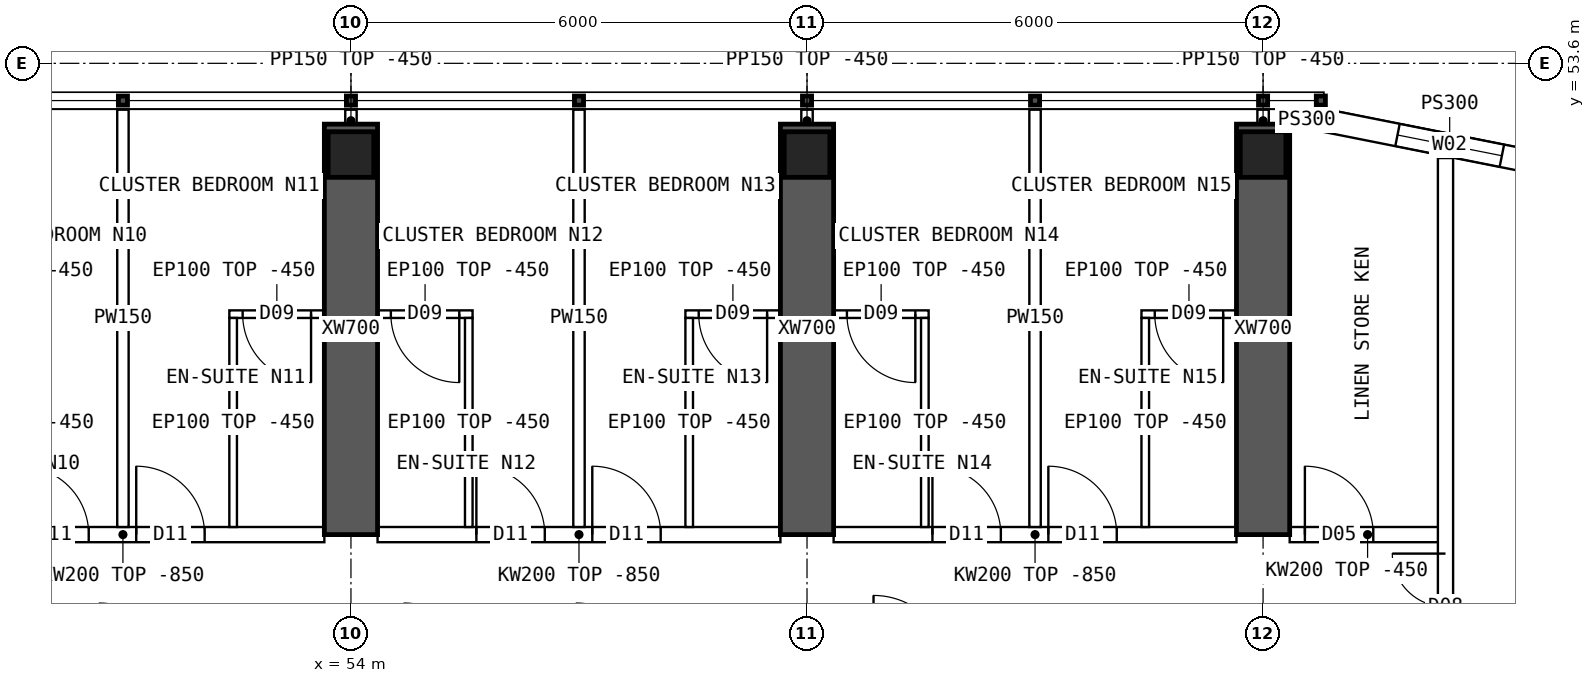
"""IFC4 building model, lengths in metres.
Left out: names, types, materials, properties, quantities, classifications, styles, units other than length and angle.
Written with IfcOpenShell. Run it as: python <this file> out.ifc"""

import sys

from ifc_helpers import new_model, si_unit, direction, frame, frame_2d, origin, origin_2d, place, context, subcontext, project, spatial, polyline, rectangle, hollow_rectangle, outline, extrude, element, fill, save


model = new_model("IFC4")
c1 = context("Model", 3, precision=1e-05, world=origin(), true_north=direction((0.0, 1.0)))
c2 = subcontext(c1, "Body", "Model", "MODEL_VIEW")
j1 = project(units=[si_unit("LENGTHUNIT", "METRE"), si_unit("PLANEANGLEUNIT", "RADIAN")], contexts=[c1])
p1 = place(None, origin())
s1 = spatial("IfcSite", under=j1, at=p1, CompositionType="ELEMENT")
p2 = place(p1, origin())
s2 = spatial("IfcBuilding", under=s1, at=p2, CompositionType="ELEMENT")
p3 = place(p2, frame((0.0, 0.0, 242.8)))
s3 = spatial("IfcBuildingStorey", under=s2, at=p3, CompositionType="ELEMENT", Elevation=242.8)
for number, where, z_axis, x_axis in (
    (1, (54.0, 52.4, 0.0), (0.0, 0.0, 1.0), (1.0, 0.0, 0.0)),
    (2, (60.0, 52.4, 0.0), (0.0, 0.0, 1.0), (1.0, 0.0, 0.0)),
    (3, (66.0, 52.4, 0.0), (0.0, 0.0, 1.0), (1.0, 0.0, 0.0)),
):
    element("IfcColumn", number, at=place(p3, frame(where, z_axis=z_axis, x_axis=x_axis)), inside=s3, PredefinedType="COLUMN", context=c2, shape_type="SweptSolid", body=[
        extrude(hollow_rectangle(XDim=0.6, YDim=0.6, WallThickness=0.06, at=origin_2d()), origin(), (0.0, 0.0, 1.0), 3.75),
    ])
for number, where, z_axis, x_axis in (
    (4, (54.0, 47.4, 0.0), (0.0, 0.0, 1.0), (0.0, 1.0, 0.0)),
    (5, (60.0, 47.4, 0.0), (0.0, 0.0, 1.0), (0.0, 1.0, 0.0)),
    (6, (66.0, 47.4, 0.0), (0.0, 0.0, 1.0), (0.0, 1.0, 0.0)),
):
    element("IfcWall", number, at=place(p3, frame(where, z_axis=z_axis, x_axis=x_axis)), inside=s3, PredefinedType="SHEAR", context=c2, shape_type="SweptSolid", body=[
        extrude(rectangle(XDim=5.4, YDim=0.7, at=frame_2d((2.7, 0.0))), origin(), (0.0, 0.0, 1.0), 3.75),
    ])
p4 = place(p3, frame((70.11, 52.192, 0.0), z_axis=(0.0, 0.0, 1.0), x_axis=(-0.98078325777, 0.195100490205, 0.0)))
e7 = element("IfcWall", 7, at=p4, inside=s3, PredefinedType="SOLIDWALL", context=c2, shape_type="SweptSolid", body=[
    extrude(outline(polyline([(-0.03, -0.15), (3.405, -0.15), (3.345, 0.15), (0.03, 0.15), (-0.03, -0.15)])), origin(), (0.0, 0.0, 1.0), 3.3),
])
p5 = place(p4, frame((0.988, 0.0, 0.9)))
e8 = element("IfcOpeningElement", 8, at=p5, cuts=e7, PredefinedType="OPENING", context=c2, shape_type="SweptSolid", body=[
    extrude(rectangle(XDim=1.4, YDim=1.8, at=frame_2d((0.7, 0.9))), frame((0.0, 0.16, 0.0), z_axis=(0.0, -1.0, 0.0), x_axis=(1.0, 0.0, 0.0)), (0.0, 0.0, 1.0), 0.32),
])
p6 = place(p3, frame((66.8, 52.85, 0.0), z_axis=(0.0, 0.0, 1.0), x_axis=(-1.0, 0.0, 0.0)))
e9 = element("IfcWall", 9, at=p6, inside=s3, PredefinedType="SOLIDWALL", context=c2, shape_type="SweptSolid", body=[
    extrude(rectangle(XDim=0.45, YDim=0.3, at=frame_2d((0.225, 0.0))), origin(), (0.0, 0.0, 1.0), 3.3),
])
p7 = place(p3, frame((48.35, 47.4, 0.0), z_axis=(0.0, 0.0, 1.0), x_axis=(1.0, 0.0, 0.0)))
e10 = element("IfcWall", 10, at=p7, inside=s3, PredefinedType="SOLIDWALL", context=c2, shape_type="SweptSolid", body=[
    extrude(outline(polyline([(0.0, 0.0), (5.3, 0.0), (5.3, 2.9), (0.0, 2.9), (0.0, 0.0)])), frame((0.0, 0.1, 0.0), z_axis=(0.0, -1.0, 0.0), x_axis=(1.0, 0.0, 0.0)), (0.0, 0.0, 1.0), 0.2),
])
p8 = place(p7, frame((1.3, 0.0, 0.0)))
e11 = element("IfcOpeningElement", 11, at=p8, cuts=e10, PredefinedType="OPENING", context=c2, shape_type="SweptSolid", body=[
    extrude(rectangle(XDim=0.9, YDim=2.1, at=frame_2d((0.45, 1.05))), frame((0.0, 0.11, 0.0), z_axis=(0.0, -1.0, 0.0), x_axis=(1.0, 0.0, 0.0)), (0.0, 0.0, 1.0), 0.22),
])
p9 = place(p7, frame((2.825, 0.0, 0.0)))
e12 = element("IfcOpeningElement", 12, at=p9, cuts=e10, PredefinedType="OPENING", context=c2, shape_type="SweptSolid", body=[
    extrude(rectangle(XDim=0.9, YDim=2.1, at=frame_2d((0.45, 1.05))), frame((0.0, 0.11, 0.0), z_axis=(0.0, -1.0, 0.0), x_axis=(1.0, 0.0, 0.0)), (0.0, 0.0, 1.0), 0.22),
])
p10 = place(p3, frame((54.35, 47.4, 0.0), z_axis=(0.0, 0.0, 1.0), x_axis=(1.0, 0.0, 0.0)))
e13 = element("IfcWall", 13, at=p10, inside=s3, PredefinedType="SOLIDWALL", context=c2, shape_type="SweptSolid", body=[
    extrude(outline(polyline([(0.0, 0.0), (5.3, 0.0), (5.3, 2.9), (0.0, 2.9), (0.0, 0.0)])), frame((0.0, 0.1, 0.0), z_axis=(0.0, -1.0, 0.0), x_axis=(1.0, 0.0, 0.0)), (0.0, 0.0, 1.0), 0.2),
])
p11 = place(p10, frame((1.3, 0.0, 0.0)))
e14 = element("IfcOpeningElement", 14, at=p11, cuts=e13, PredefinedType="OPENING", context=c2, shape_type="SweptSolid", body=[
    extrude(rectangle(XDim=0.9, YDim=2.1, at=frame_2d((0.45, 1.05))), frame((0.0, 0.11, 0.0), z_axis=(0.0, -1.0, 0.0), x_axis=(1.0, 0.0, 0.0)), (0.0, 0.0, 1.0), 0.22),
])
p12 = place(p10, frame((2.825, 0.0, 0.0)))
e15 = element("IfcOpeningElement", 15, at=p12, cuts=e13, PredefinedType="OPENING", context=c2, shape_type="SweptSolid", body=[
    extrude(rectangle(XDim=0.9, YDim=2.1, at=frame_2d((0.45, 1.05))), frame((0.0, 0.11, 0.0), z_axis=(0.0, -1.0, 0.0), x_axis=(1.0, 0.0, 0.0)), (0.0, 0.0, 1.0), 0.22),
])
p13 = place(p3, frame((60.35, 47.4, 0.0), z_axis=(0.0, 0.0, 1.0), x_axis=(1.0, 0.0, 0.0)))
e16 = element("IfcWall", 16, at=p13, inside=s3, PredefinedType="SOLIDWALL", context=c2, shape_type="SweptSolid", body=[
    extrude(outline(polyline([(0.0, 0.0), (5.3, 0.0), (5.3, 2.9), (0.0, 2.9), (0.0, 0.0)])), frame((0.0, 0.1, 0.0), z_axis=(0.0, -1.0, 0.0), x_axis=(1.0, 0.0, 0.0)), (0.0, 0.0, 1.0), 0.2),
])
p14 = place(p13, frame((1.3, 0.0, 0.0)))
e17 = element("IfcOpeningElement", 17, at=p14, cuts=e16, PredefinedType="OPENING", context=c2, shape_type="SweptSolid", body=[
    extrude(rectangle(XDim=0.9, YDim=2.1, at=frame_2d((0.45, 1.05))), frame((0.0, 0.11, 0.0), z_axis=(0.0, -1.0, 0.0), x_axis=(1.0, 0.0, 0.0)), (0.0, 0.0, 1.0), 0.22),
])
p15 = place(p13, frame((2.825, 0.0, 0.0)))
e18 = element("IfcOpeningElement", 18, at=p15, cuts=e16, PredefinedType="OPENING", context=c2, shape_type="SweptSolid", body=[
    extrude(rectangle(XDim=0.9, YDim=2.1, at=frame_2d((0.45, 1.05))), frame((0.0, 0.11, 0.0), z_axis=(0.0, -1.0, 0.0), x_axis=(1.0, 0.0, 0.0)), (0.0, 0.0, 1.0), 0.22),
])
p16 = place(p3, frame((66.35, 47.4, 0.0), z_axis=(0.0, 0.0, 1.0), x_axis=(1.0, 0.0, 0.0)))
e19 = element("IfcWall", 19, at=p16, inside=s3, PredefinedType="SOLIDWALL", context=c2, shape_type="SweptSolid", body=[
    extrude(rectangle(XDim=2.05, YDim=0.2, at=frame_2d((1.025, 0.0))), origin(), (0.0, 0.0, 1.0), 3.3),
])
p17 = place(p16, frame((0.2, 0.0, 0.0)))
e20 = element("IfcOpeningElement", 20, at=p17, cuts=e19, PredefinedType="OPENING", context=c2, shape_type="SweptSolid", body=[
    extrude(rectangle(XDim=0.9, YDim=2.1, at=frame_2d((0.45, 1.05))), frame((0.0, 0.11, 0.0), z_axis=(0.0, -1.0, 0.0), x_axis=(1.0, 0.0, 0.0)), (0.0, 0.0, 1.0), 0.22),
])
p18 = place(p3, frame((51.0, 52.99, 0.0), z_axis=(0.0, 0.0, 1.0), x_axis=(0.0, -1.0, 0.0)))
e21 = element("IfcWall", 21, at=p18, inside=s3, PredefinedType="PARTITIONING", context=c2, shape_type="SweptSolid", body=[
    extrude(outline(polyline([(0.0, 0.0), (5.49, 0.0), (5.49, 2.9), (5.442, 2.9), (5.44, 3.3), (0.792, 3.3), (0.79, 2.9), (0.392, 2.9), (0.39, 3.3), (0.0, 3.3), (0.0, 0.0)])), frame((0.0, 0.075, 0.0), z_axis=(0.0, -1.0, 0.0), x_axis=(1.0, 0.0, 0.0)), (0.0, 0.0, 1.0), 0.15),
])
p19 = place(p3, frame((52.4, 50.3, 0.0), z_axis=(0.0, 0.0, 1.0), x_axis=(1.0, 0.0, 0.0)))
e22 = element("IfcWall", 22, at=p19, inside=s3, PredefinedType="PARTITIONING", context=c2, shape_type="SweptSolid", body=[
    extrude(rectangle(XDim=1.25, YDim=0.1, at=frame_2d((0.625, 0.0))), origin(), (0.0, 0.0, 1.0), 3.3),
])
p20 = place(p19, frame((0.175, 0.0, 0.0)))
e23 = element("IfcOpeningElement", 23, at=p20, cuts=e22, PredefinedType="OPENING", context=c2, shape_type="SweptSolid", body=[
    extrude(rectangle(XDim=0.9, YDim=2.1, at=frame_2d((0.45, 1.05))), frame((0.0, 0.06, 0.0), z_axis=(0.0, -1.0, 0.0), x_axis=(1.0, 0.0, 0.0)), (0.0, 0.0, 1.0), 0.12),
])
p21 = place(p3, frame((52.45, 50.25, 0.0), z_axis=(0.0, 0.0, 1.0), x_axis=(0.0, -1.0, 0.0)))
e24 = element("IfcWall", 24, at=p21, inside=s3, PredefinedType="PARTITIONING", context=c2, shape_type="SweptSolid", body=[
    extrude(outline(polyline([(0.0, 0.0), (2.75, 0.0), (2.75, 2.9), (2.702, 2.9), (2.7, 3.3), (0.0, 3.3), (0.0, 0.0)])), frame((0.0, 0.05, 0.0), z_axis=(0.0, -1.0, 0.0), x_axis=(1.0, 0.0, 0.0)), (0.0, 0.0, 1.0), 0.1),
])
p22 = place(p3, frame((57.0, 52.99, 0.0), z_axis=(0.0, 0.0, 1.0), x_axis=(0.0, -1.0, 0.0)))
e25 = element("IfcWall", 25, at=p22, inside=s3, PredefinedType="PARTITIONING", context=c2, shape_type="SweptSolid", body=[
    extrude(outline(polyline([(0.0, 0.0), (5.49, 0.0), (5.49, 2.9), (5.442, 2.9), (5.44, 3.3), (0.792, 3.3), (0.79, 2.9), (0.392, 2.9), (0.39, 3.3), (0.0, 3.3), (0.0, 0.0)])), frame((0.0, 0.075, 0.0), z_axis=(0.0, -1.0, 0.0), x_axis=(1.0, 0.0, 0.0)), (0.0, 0.0, 1.0), 0.15),
])
p23 = place(p3, frame((54.35, 50.3, 0.0), z_axis=(0.0, 0.0, 1.0), x_axis=(1.0, 0.0, 0.0)))
e26 = element("IfcWall", 26, at=p23, inside=s3, PredefinedType="PARTITIONING", context=c2, shape_type="SweptSolid", body=[
    extrude(rectangle(XDim=1.25, YDim=0.1, at=frame_2d((0.625, 0.0))), origin(), (0.0, 0.0, 1.0), 3.3),
])
p24 = place(p23, frame((0.175, 0.0, 0.0)))
e27 = element("IfcOpeningElement", 27, at=p24, cuts=e26, PredefinedType="OPENING", context=c2, shape_type="SweptSolid", body=[
    extrude(rectangle(XDim=0.9, YDim=2.1, at=frame_2d((0.45, 1.05))), frame((0.0, 0.06, 0.0), z_axis=(0.0, -1.0, 0.0), x_axis=(1.0, 0.0, 0.0)), (0.0, 0.0, 1.0), 0.12),
])
p25 = place(p3, frame((55.55, 50.25, 0.0), z_axis=(0.0, 0.0, 1.0), x_axis=(0.0, -1.0, 0.0)))
e28 = element("IfcWall", 28, at=p25, inside=s3, PredefinedType="PARTITIONING", context=c2, shape_type="SweptSolid", body=[
    extrude(outline(polyline([(0.0, 0.0), (2.75, 0.0), (2.75, 2.9), (2.702, 2.9), (2.7, 3.3), (0.0, 3.3), (0.0, 0.0)])), frame((0.0, 0.05, 0.0), z_axis=(0.0, -1.0, 0.0), x_axis=(1.0, 0.0, 0.0)), (0.0, 0.0, 1.0), 0.1),
])
p26 = place(p3, frame((58.4, 50.3, 0.0), z_axis=(0.0, 0.0, 1.0), x_axis=(1.0, 0.0, 0.0)))
e29 = element("IfcWall", 29, at=p26, inside=s3, PredefinedType="PARTITIONING", context=c2, shape_type="SweptSolid", body=[
    extrude(rectangle(XDim=1.25, YDim=0.1, at=frame_2d((0.625, 0.0))), origin(), (0.0, 0.0, 1.0), 3.3),
])
p27 = place(p26, frame((0.175, 0.0, 0.0)))
e30 = element("IfcOpeningElement", 30, at=p27, cuts=e29, PredefinedType="OPENING", context=c2, shape_type="SweptSolid", body=[
    extrude(rectangle(XDim=0.9, YDim=2.1, at=frame_2d((0.45, 1.05))), frame((0.0, 0.06, 0.0), z_axis=(0.0, -1.0, 0.0), x_axis=(1.0, 0.0, 0.0)), (0.0, 0.0, 1.0), 0.12),
])
p28 = place(p3, frame((58.45, 50.25, 0.0), z_axis=(0.0, 0.0, 1.0), x_axis=(0.0, -1.0, 0.0)))
e31 = element("IfcWall", 31, at=p28, inside=s3, PredefinedType="PARTITIONING", context=c2, shape_type="SweptSolid", body=[
    extrude(outline(polyline([(0.0, 0.0), (2.75, 0.0), (2.75, 2.9), (2.702, 2.9), (2.7, 3.3), (0.0, 3.3), (0.0, 0.0)])), frame((0.0, 0.05, 0.0), z_axis=(0.0, -1.0, 0.0), x_axis=(1.0, 0.0, 0.0)), (0.0, 0.0, 1.0), 0.1),
])
p29 = place(p3, frame((63.0, 52.99, 0.0), z_axis=(0.0, 0.0, 1.0), x_axis=(0.0, -1.0, 0.0)))
e32 = element("IfcWall", 32, at=p29, inside=s3, PredefinedType="PARTITIONING", context=c2, shape_type="SweptSolid", body=[
    extrude(outline(polyline([(0.0, 0.0), (5.49, 0.0), (5.49, 2.9), (5.442, 2.9), (5.44, 3.3), (0.792, 3.3), (0.79, 2.9), (0.392, 2.9), (0.39, 3.3), (0.0, 3.3), (0.0, 0.0)])), frame((0.0, 0.075, 0.0), z_axis=(0.0, -1.0, 0.0), x_axis=(1.0, 0.0, 0.0)), (0.0, 0.0, 1.0), 0.15),
])
p30 = place(p3, frame((60.35, 50.3, 0.0), z_axis=(0.0, 0.0, 1.0), x_axis=(1.0, 0.0, 0.0)))
e33 = element("IfcWall", 33, at=p30, inside=s3, PredefinedType="PARTITIONING", context=c2, shape_type="SweptSolid", body=[
    extrude(rectangle(XDim=1.25, YDim=0.1, at=frame_2d((0.625, 0.0))), origin(), (0.0, 0.0, 1.0), 3.3),
])
p31 = place(p30, frame((0.175, 0.0, 0.0)))
e34 = element("IfcOpeningElement", 34, at=p31, cuts=e33, PredefinedType="OPENING", context=c2, shape_type="SweptSolid", body=[
    extrude(rectangle(XDim=0.9, YDim=2.1, at=frame_2d((0.45, 1.05))), frame((0.0, 0.06, 0.0), z_axis=(0.0, -1.0, 0.0), x_axis=(1.0, 0.0, 0.0)), (0.0, 0.0, 1.0), 0.12),
])
p32 = place(p3, frame((61.55, 50.25, 0.0), z_axis=(0.0, 0.0, 1.0), x_axis=(0.0, -1.0, 0.0)))
e35 = element("IfcWall", 35, at=p32, inside=s3, PredefinedType="PARTITIONING", context=c2, shape_type="SweptSolid", body=[
    extrude(outline(polyline([(0.0, 0.0), (2.75, 0.0), (2.75, 2.9), (2.702, 2.9), (2.7, 3.3), (0.0, 3.3), (0.0, 0.0)])), frame((0.0, 0.05, 0.0), z_axis=(0.0, -1.0, 0.0), x_axis=(1.0, 0.0, 0.0)), (0.0, 0.0, 1.0), 0.1),
])
p33 = place(p3, frame((64.4, 50.3, 0.0), z_axis=(0.0, 0.0, 1.0), x_axis=(1.0, 0.0, 0.0)))
e36 = element("IfcWall", 36, at=p33, inside=s3, PredefinedType="PARTITIONING", context=c2, shape_type="SweptSolid", body=[
    extrude(rectangle(XDim=1.25, YDim=0.1, at=frame_2d((0.625, 0.0))), origin(), (0.0, 0.0, 1.0), 3.3),
])
p34 = place(p33, frame((0.175, 0.0, 0.0)))
e37 = element("IfcOpeningElement", 37, at=p34, cuts=e36, PredefinedType="OPENING", context=c2, shape_type="SweptSolid", body=[
    extrude(rectangle(XDim=0.9, YDim=2.1, at=frame_2d((0.45, 1.05))), frame((0.0, 0.06, 0.0), z_axis=(0.0, -1.0, 0.0), x_axis=(1.0, 0.0, 0.0)), (0.0, 0.0, 1.0), 0.12),
])
p35 = place(p3, frame((64.45, 50.25, 0.0), z_axis=(0.0, 0.0, 1.0), x_axis=(0.0, -1.0, 0.0)))
e38 = element("IfcWall", 38, at=p35, inside=s3, PredefinedType="PARTITIONING", context=c2, shape_type="SweptSolid", body=[
    extrude(outline(polyline([(0.0, 0.0), (2.75, 0.0), (2.75, 2.9), (2.702, 2.9), (2.7, 3.3), (0.0, 3.3), (0.0, 0.0)])), frame((0.0, 0.05, 0.0), z_axis=(0.0, -1.0, 0.0), x_axis=(1.0, 0.0, 0.0)), (0.0, 0.0, 1.0), 0.1),
])
p36 = place(p3, frame((68.4, 11.646, 0.0), z_axis=(0.0, 0.0, 1.0), x_axis=(0.0, 1.0, 0.0)))
e39 = element("IfcWall", 39, at=p36, inside=s3, PredefinedType="SOLIDWALL", context=c2, shape_type="SweptSolid", body=[
    extrude(rectangle(XDim=40.708, YDim=0.2, at=frame_2d((20.354, 0.0))), origin(), (0.0, 0.0, 1.0), 3.3),
])
p37 = place(p36, frame((5.104, 0.0, 0.0)))
e40 = element("IfcOpeningElement", 40, at=p37, cuts=e39, PredefinedType="OPENING", context=c2, shape_type="SweptSolid", body=[
    extrude(rectangle(XDim=1.4, YDim=2.1, at=frame_2d((0.7, 1.05))), frame((0.0, 0.11, 0.0), z_axis=(0.0, -1.0, 0.0), x_axis=(1.0, 0.0, 0.0)), (0.0, 0.0, 1.0), 0.22),
])
p38 = place(p36, frame((34.104, 0.0, 0.0)))
e41 = element("IfcOpeningElement", 41, at=p38, cuts=e39, PredefinedType="OPENING", context=c2, shape_type="SweptSolid", body=[
    extrude(rectangle(XDim=1.4, YDim=2.1, at=frame_2d((0.7, 1.05))), frame((0.0, 0.11, 0.0), z_axis=(0.0, -1.0, 0.0), x_axis=(1.0, 0.0, 0.0)), (0.0, 0.0, 1.0), 0.22),
])
for number, where, z_axis, x_axis in (
    (42, (54.0, 52.7, 0.0), (0.0, 0.0, 1.0), (0.0, 1.0, 0.0)),
    (43, (60.0, 52.7, 0.0), (0.0, 0.0, 1.0), (0.0, 1.0, 0.0)),
    (44, (66.0, 52.7, 0.0), (0.0, 0.0, 1.0), (0.0, 1.0, 0.0)),
):
    element("IfcWall", number, at=place(p3, frame(where, z_axis=z_axis, x_axis=x_axis)), inside=s3, PredefinedType="PARTITIONING", context=c2, shape_type="SweptSolid", body=[
        extrude(rectangle(XDim=0.29, YDim=0.15, at=frame_2d((0.145, 0.0))), origin(), (0.0, 0.0, 1.0), 3.3),
    ])
p39 = place(p5, origin())
e45 = element("IfcWindow", 45, at=p39, inside=s3, PartitioningType="SINGLE_PANEL", PredefinedType="WINDOW", context=c2, shape_type="SweptSolid", body=[
    extrude(rectangle(XDim=1.4, YDim=1.8, at=frame_2d((0.7, 0.9))), frame((0.0, 0.03, 0.0), z_axis=(0.0, -1.0, 0.0), x_axis=(1.0, 0.0, 0.0)), (0.0, 0.0, 1.0), 0.06),
])
fill(e8, e45)
p40 = place(p8, origin())
e46 = element("IfcDoor", 46, at=p40, inside=s3, OperationType="SINGLE_SWING_LEFT", PredefinedType="DOOR", context=c2, shape_type="SweptSolid", body=[
    extrude(rectangle(XDim=0.9, YDim=2.1, at=frame_2d((0.45, 1.05))), frame((0.0, 0.025, 0.0), z_axis=(0.0, -1.0, 0.0), x_axis=(1.0, 0.0, 0.0)), (0.0, 0.0, 1.0), 0.05),
])
fill(e11, e46)
p41 = place(p20, origin())
e47 = element("IfcDoor", 47, at=p41, inside=s3, OperationType="SINGLE_SWING_RIGHT", PredefinedType="DOOR", context=c2, shape_type="SweptSolid", body=[
    extrude(rectangle(XDim=0.9, YDim=2.1, at=frame_2d((0.45, 1.05))), frame((0.0, 0.025, 0.0), z_axis=(0.0, -1.0, 0.0), x_axis=(1.0, 0.0, 0.0)), (0.0, 0.0, 1.0), 0.05),
])
fill(e23, e47)
p42 = place(p9, origin())
e48 = element("IfcDoor", 48, at=p42, inside=s3, OperationType="SINGLE_SWING_LEFT", PredefinedType="DOOR", context=c2, shape_type="SweptSolid", body=[
    extrude(rectangle(XDim=0.9, YDim=2.1, at=frame_2d((0.45, 1.05))), frame((0.0, 0.025, 0.0), z_axis=(0.0, -1.0, 0.0), x_axis=(1.0, 0.0, 0.0)), (0.0, 0.0, 1.0), 0.05),
])
fill(e12, e48)
p43 = place(p24, origin())
e49 = element("IfcDoor", 49, at=p43, inside=s3, OperationType="SINGLE_SWING_RIGHT", PredefinedType="DOOR", context=c2, shape_type="SweptSolid", body=[
    extrude(rectangle(XDim=0.9, YDim=2.1, at=frame_2d((0.45, 1.05))), frame((0.0, 0.025, 0.0), z_axis=(0.0, -1.0, 0.0), x_axis=(1.0, 0.0, 0.0)), (0.0, 0.0, 1.0), 0.05),
])
fill(e27, e49)
p44 = place(p11, origin())
e50 = element("IfcDoor", 50, at=p44, inside=s3, OperationType="SINGLE_SWING_LEFT", PredefinedType="DOOR", context=c2, shape_type="SweptSolid", body=[
    extrude(rectangle(XDim=0.9, YDim=2.1, at=frame_2d((0.45, 1.05))), frame((0.0, 0.025, 0.0), z_axis=(0.0, -1.0, 0.0), x_axis=(1.0, 0.0, 0.0)), (0.0, 0.0, 1.0), 0.05),
])
fill(e14, e50)
p45 = place(p27, origin())
e51 = element("IfcDoor", 51, at=p45, inside=s3, OperationType="SINGLE_SWING_RIGHT", PredefinedType="DOOR", context=c2, shape_type="SweptSolid", body=[
    extrude(rectangle(XDim=0.9, YDim=2.1, at=frame_2d((0.45, 1.05))), frame((0.0, 0.025, 0.0), z_axis=(0.0, -1.0, 0.0), x_axis=(1.0, 0.0, 0.0)), (0.0, 0.0, 1.0), 0.05),
])
fill(e30, e51)
p46 = place(p12, origin())
e52 = element("IfcDoor", 52, at=p46, inside=s3, OperationType="SINGLE_SWING_LEFT", PredefinedType="DOOR", context=c2, shape_type="SweptSolid", body=[
    extrude(rectangle(XDim=0.9, YDim=2.1, at=frame_2d((0.45, 1.05))), frame((0.0, 0.025, 0.0), z_axis=(0.0, -1.0, 0.0), x_axis=(1.0, 0.0, 0.0)), (0.0, 0.0, 1.0), 0.05),
])
fill(e15, e52)
p47 = place(p31, origin())
e53 = element("IfcDoor", 53, at=p47, inside=s3, OperationType="SINGLE_SWING_RIGHT", PredefinedType="DOOR", context=c2, shape_type="SweptSolid", body=[
    extrude(rectangle(XDim=0.9, YDim=2.1, at=frame_2d((0.45, 1.05))), frame((0.0, 0.025, 0.0), z_axis=(0.0, -1.0, 0.0), x_axis=(1.0, 0.0, 0.0)), (0.0, 0.0, 1.0), 0.05),
])
fill(e34, e53)
p48 = place(p14, origin())
e54 = element("IfcDoor", 54, at=p48, inside=s3, OperationType="SINGLE_SWING_LEFT", PredefinedType="DOOR", context=c2, shape_type="SweptSolid", body=[
    extrude(rectangle(XDim=0.9, YDim=2.1, at=frame_2d((0.45, 1.05))), frame((0.0, 0.025, 0.0), z_axis=(0.0, -1.0, 0.0), x_axis=(1.0, 0.0, 0.0)), (0.0, 0.0, 1.0), 0.05),
])
fill(e17, e54)
p49 = place(p34, origin())
e55 = element("IfcDoor", 55, at=p49, inside=s3, OperationType="SINGLE_SWING_RIGHT", PredefinedType="DOOR", context=c2, shape_type="SweptSolid", body=[
    extrude(rectangle(XDim=0.9, YDim=2.1, at=frame_2d((0.45, 1.05))), frame((0.0, 0.025, 0.0), z_axis=(0.0, -1.0, 0.0), x_axis=(1.0, 0.0, 0.0)), (0.0, 0.0, 1.0), 0.05),
])
fill(e37, e55)
p50 = place(p15, origin())
e56 = element("IfcDoor", 56, at=p50, inside=s3, OperationType="SINGLE_SWING_LEFT", PredefinedType="DOOR", context=c2, shape_type="SweptSolid", body=[
    extrude(rectangle(XDim=0.9, YDim=2.1, at=frame_2d((0.45, 1.05))), frame((0.0, 0.025, 0.0), z_axis=(0.0, -1.0, 0.0), x_axis=(1.0, 0.0, 0.0)), (0.0, 0.0, 1.0), 0.05),
])
fill(e18, e56)
p51 = place(p38, origin())
e57 = element("IfcDoor", 57, at=p51, inside=s3, OperationType="DOUBLE_DOOR_SINGLE_SWING", PredefinedType="DOOR", context=c2, shape_type="SweptSolid", body=[
    extrude(rectangle(XDim=1.4, YDim=2.1, at=frame_2d((0.7, 1.05))), frame((0.0, 0.025, 0.0), z_axis=(0.0, -1.0, 0.0), x_axis=(1.0, 0.0, 0.0)), (0.0, 0.0, 1.0), 0.05),
])
fill(e41, e57)
p52 = place(p17, origin())
e58 = element("IfcDoor", 58, at=p52, inside=s3, OperationType="SINGLE_SWING_LEFT", PredefinedType="DOOR", context=c2, shape_type="SweptSolid", body=[
    extrude(rectangle(XDim=0.9, YDim=2.1, at=frame_2d((0.45, 1.05))), frame((0.0, 0.025, 0.0), z_axis=(0.0, -1.0, 0.0), x_axis=(1.0, 0.0, 0.0)), (0.0, 0.0, 1.0), 0.05),
])
fill(e20, e58)
save(model, sys.argv[1])
